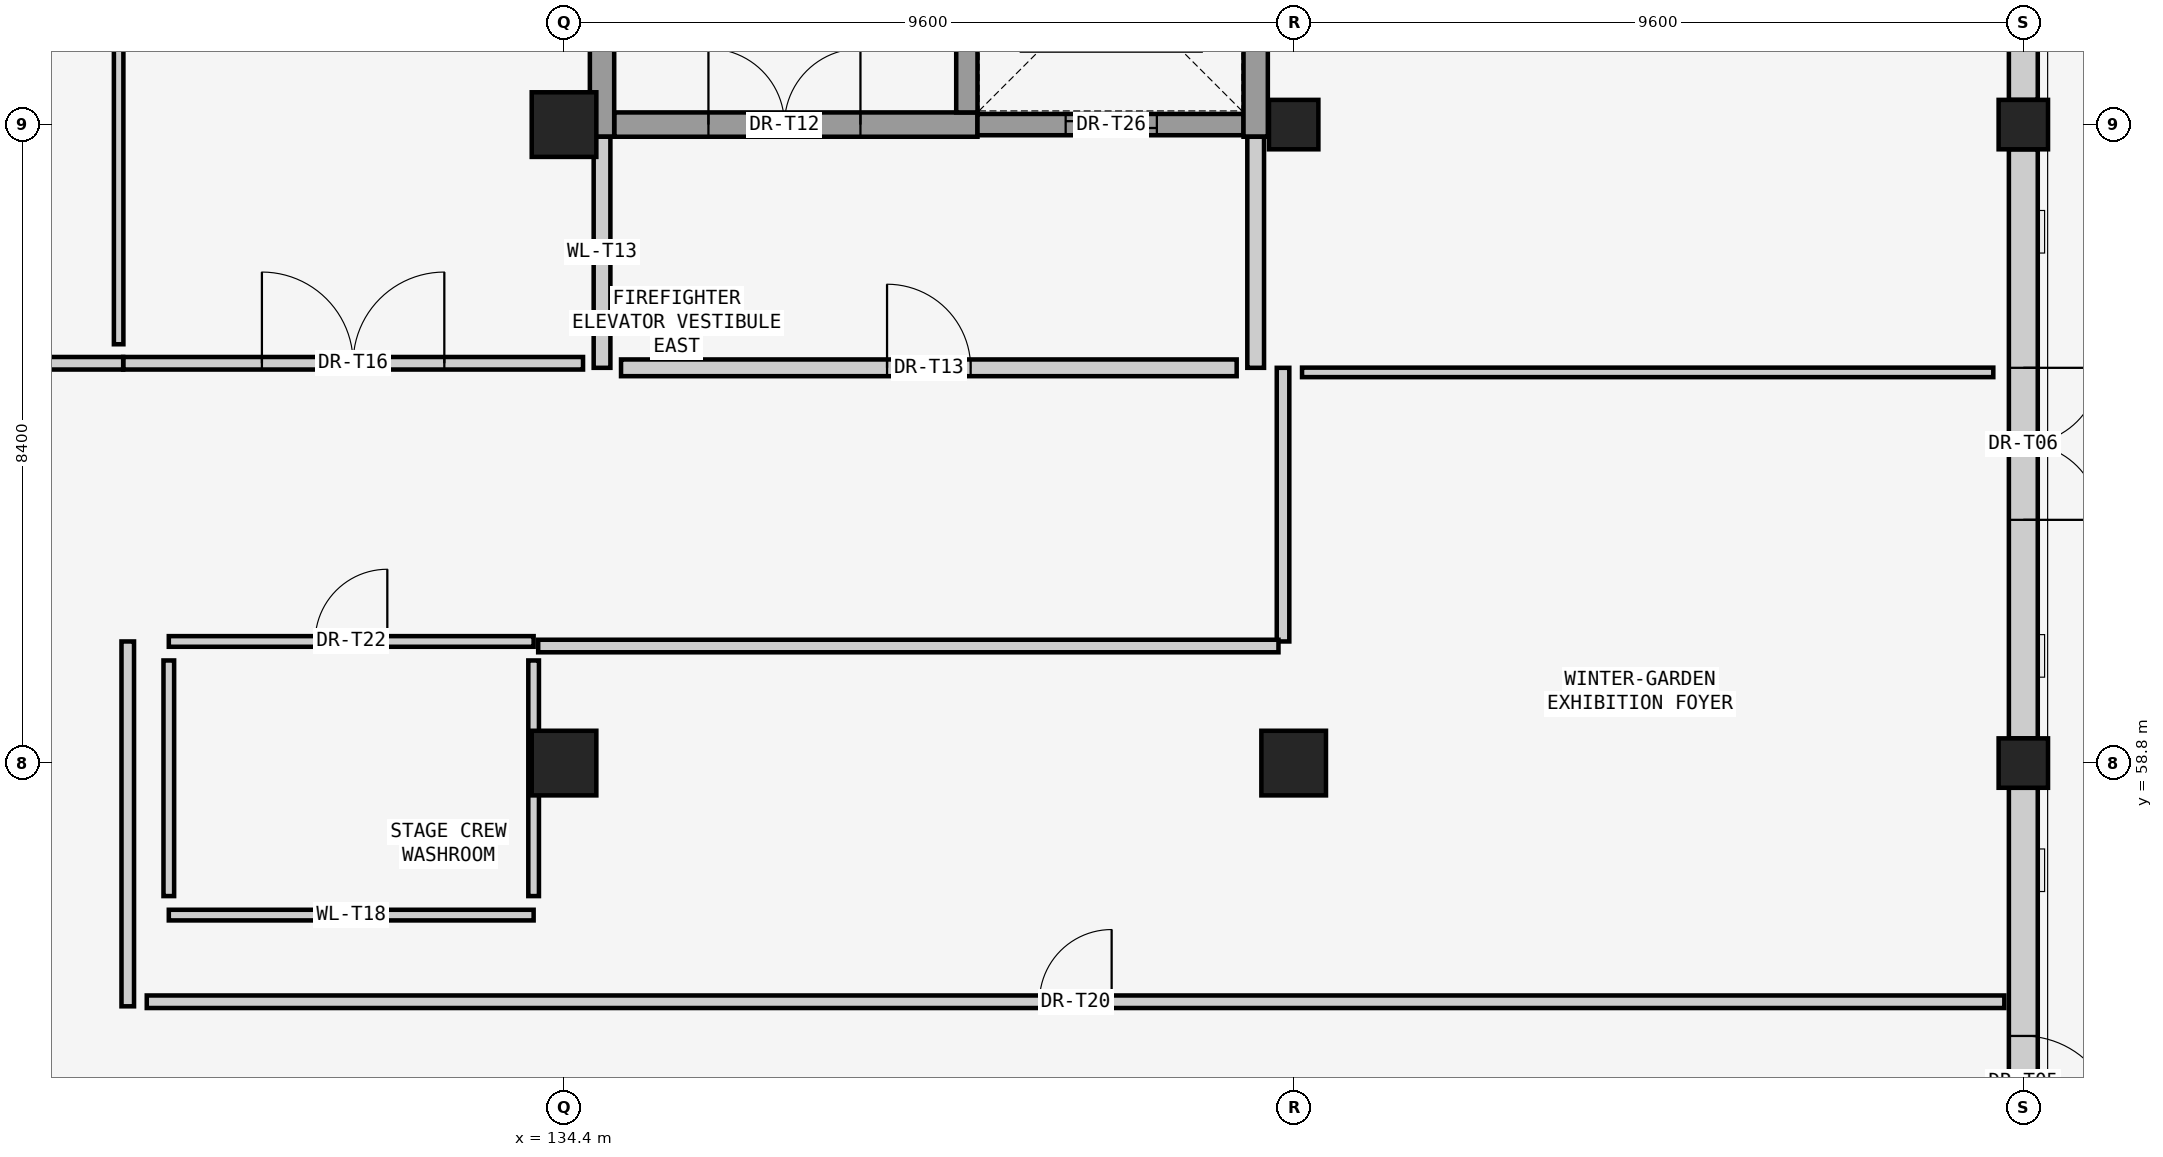
"""IFC4 building model, lengths in metres.
Left out: names, types, materials, properties, quantities, classifications, styles, units other than length and angle.
Written with IfcOpenShell. Run it as: python <this file> out.ifc"""

import sys

from ifc_helpers import new_model, si_unit, direction, frame, frame_2d, origin, origin_2d, place, context, subcontext, project, spatial, rectangle, extrude, element, fill, save


model = new_model("IFC4")
c1 = context("Model", 3, precision=1e-05, world=origin(), true_north=direction((0.0, 1.0)))
c2 = subcontext(c1, "Body", "Model", "MODEL_VIEW")
j1 = project(units=[si_unit("LENGTHUNIT", "METRE"), si_unit("PLANEANGLEUNIT", "RADIAN")], contexts=[c1])
p1 = place(None, origin())
s1 = spatial("IfcSite", under=j1, at=p1, CompositionType="ELEMENT")
p2 = place(p1, origin())
s2 = spatial("IfcBuilding", under=s1, at=p2, CompositionType="ELEMENT")
p3 = place(p2, origin())
s3 = spatial("IfcBuildingStorey", under=s2, at=p3, CompositionType="ELEMENT", Elevation=0.0)
for number, where, z_axis, x_axis in (
    (1, (134.4, 58.8, 0.0), (0.0, 0.0, 1.0), (1.0, 0.0, 0.0)),
    (2, (134.4, 67.2, 0.0), (0.0, 0.0, 1.0), (1.0, 0.0, 0.0)),
    (3, (144.0, 58.8, 0.0), (0.0, 0.0, 1.0), (1.0, 0.0, 0.0)),
):
    element("IfcColumn", number, at=place(p3, frame(where, z_axis=z_axis, x_axis=x_axis)), inside=s3, PredefinedType="COLUMN", context=c2, shape_type="SweptSolid", body=[
        extrude(rectangle(XDim=0.85, YDim=0.85, at=origin_2d()), origin(), (0.0, 0.0, 1.0), 5.12),
    ])
p4 = place(p3, frame((144.0, 67.2, 0.0), z_axis=(0.0, 0.0, 1.0), x_axis=(1.0, 0.0, 0.0)))
e4 = element("IfcColumn", 4, at=p4, inside=s3, PredefinedType="PILASTER", context=c2, shape_type="SweptSolid", body=[
    extrude(rectangle(XDim=0.65, YDim=0.65, at=origin_2d()), origin(), (0.0, 0.0, 1.0), 5.12),
])
for number, where, z_axis, x_axis in (
    (5, (153.6, 58.8, 0.0), (0.0, 0.0, 1.0), (1.0, 0.0, 0.0)),
    (6, (153.6, 67.2, 0.0), (0.0, 0.0, 1.0), (1.0, 0.0, 0.0)),
):
    element("IfcColumn", number, at=place(p3, frame(where, z_axis=z_axis, x_axis=x_axis)), inside=s3, PredefinedType="COLUMN", context=c2, shape_type="SweptSolid", body=[
        extrude(rectangle(XDim=0.65, YDim=0.65, at=origin_2d()), origin(), (0.0, 0.0, 1.0), 5.12),
    ])
p5 = place(p3, frame((153.6, 58.475, 0.0), z_axis=(0.0, 0.0, 1.0), x_axis=(0.0, -1.0, 0.0)))
e7 = element("IfcWall", 7, at=p5, inside=s3, PredefinedType="SOLIDWALL", context=c2, shape_type="SweptSolid", body=[
    extrude(rectangle(XDim=7.75, YDim=0.38, at=frame_2d((3.875, 0.0))), origin(), (0.0, 0.0, 1.0), 4.5),
])
p6 = place(p5, frame((3.265, 0.0, 0.0)))
e8 = element("IfcOpeningElement", 8, at=p6, cuts=e7, PredefinedType="OPENING", context=c2, shape_type="SweptSolid", body=[
    extrude(rectangle(XDim=1.22, YDim=2.25, at=frame_2d((0.61, 1.125))), frame((0.0, 0.2, 0.0), z_axis=(0.0, -1.0, 0.0), x_axis=(1.0, 0.0, 0.0)), (0.0, 0.0, 1.0), 0.4),
])
p7 = place(p3, frame((153.6, 66.875, 0.0), z_axis=(0.0, 0.0, 1.0), x_axis=(0.0, -1.0, 0.0)))
e9 = element("IfcWall", 9, at=p7, inside=s3, PredefinedType="SOLIDWALL", context=c2, shape_type="SweptSolid", body=[
    extrude(rectangle(XDim=7.75, YDim=0.38, at=frame_2d((3.875, 0.0))), origin(), (0.0, 0.0, 1.0), 4.5),
])
p8 = place(p7, frame((2.875, 0.0, 0.0)))
e10 = element("IfcOpeningElement", 10, at=p8, cuts=e9, PredefinedType="OPENING", context=c2, shape_type="SweptSolid", body=[
    extrude(rectangle(XDim=2.0, YDim=2.25, at=frame_2d((1.0, 1.125))), frame((0.0, 0.2, 0.0), z_axis=(0.0, -1.0, 0.0), x_axis=(1.0, 0.0, 0.0)), (0.0, 0.0, 1.0), 0.4),
])
p9 = place(p3, frame((153.6, 75.275, 0.0), z_axis=(0.0, 0.0, 1.0), x_axis=(0.0, -1.0, 0.0)))
e11 = element("IfcWall", 11, at=p9, inside=s3, PredefinedType="SOLIDWALL", context=c2, shape_type="SweptSolid", body=[
    extrude(rectangle(XDim=7.75, YDim=0.38, at=frame_2d((3.875, 0.0))), origin(), (0.0, 0.0, 1.0), 4.5),
])
p10 = place(p9, frame((1.195, 0.0, 0.85)))
e12 = element("IfcOpeningElement", 12, at=p10, cuts=e11, PredefinedType="OPENING", context=c2, shape_type="SweptSolid", body=[
    extrude(rectangle(XDim=1.95, YDim=2.5, at=frame_2d((0.975, 1.25))), frame((0.0, 0.2, 0.0), z_axis=(0.0, -1.0, 0.0), x_axis=(1.0, 0.0, 0.0)), (0.0, 0.0, 1.0), 0.4),
])
p11 = place(p3, frame((135.06, 67.2, 0.0), z_axis=(0.0, 0.0, 1.0), x_axis=(1.0, 0.0, 0.0)))
e13 = element("IfcWall", 13, at=p11, inside=s3, PredefinedType="SHEAR", context=c2, shape_type="SweptSolid", body=[
    extrude(rectangle(XDim=4.78, YDim=0.32, at=frame_2d((2.39, 0.0))), origin(), (0.0, 0.0, 1.0), 5.1),
])
p12 = place(p11, frame((1.24, 0.0, 0.0)))
e14 = element("IfcOpeningElement", 14, at=p12, cuts=e13, PredefinedType="OPENING", context=c2, shape_type="SweptSolid", body=[
    extrude(rectangle(XDim=2.0, YDim=2.2, at=frame_2d((1.0, 1.1))), frame((0.0, 0.17, 0.0), z_axis=(0.0, -1.0, 0.0), x_axis=(1.0, 0.0, 0.0)), (0.0, 0.0, 1.0), 0.34),
])
p13 = place(p3, frame((139.84, 67.2, 0.0), z_axis=(0.0, 0.0, 1.0), x_axis=(1.0, 0.0, 0.0)))
e15 = element("IfcWall", 15, at=p13, inside=s3, PredefinedType="SHEAR", context=c2, shape_type="SweptSolid", body=[
    extrude(rectangle(XDim=3.5, YDim=0.28, at=frame_2d((1.75, 0.0))), origin(), (0.0, 0.0, 1.0), 5.1),
])
p14 = place(p13, frame((1.16, 0.0, 0.0)))
e16 = element("IfcOpeningElement", 16, at=p14, cuts=e15, PredefinedType="OPENING", context=c2, shape_type="SweptSolid", body=[
    extrude(rectangle(XDim=1.2, YDim=2.2, at=frame_2d((0.6, 1.1))), frame((0.0, 0.15, 0.0), z_axis=(0.0, -1.0, 0.0), x_axis=(1.0, 0.0, 0.0)), (0.0, 0.0, 1.0), 0.3),
])
for number, where, z_axis, x_axis in (
    (17, (134.9, 75.4, 0.0), (0.0, 0.0, 1.0), (0.0, -1.0, 0.0)),
    (18, (143.5, 67.04, 0.0), (0.0, 0.0, 1.0), (0.0, 1.0, 0.0)),
):
    element("IfcWall", number, at=place(p3, frame(where, z_axis=z_axis, x_axis=x_axis)), inside=s3, PredefinedType="SHEAR", context=c2, shape_type="SweptSolid", body=[
        extrude(rectangle(XDim=8.36, YDim=0.32, at=frame_2d((4.18, 0.0))), origin(), (0.0, 0.0, 1.0), 5.1),
    ])
p15 = place(p3, frame((139.7, 67.36, 0.0), z_axis=(0.0, 0.0, 1.0), x_axis=(0.0, 1.0, 0.0)))
e19 = element("IfcWall", 19, at=p15, inside=s3, PredefinedType="SHEAR", context=c2, shape_type="SweptSolid", body=[
    extrude(rectangle(XDim=7.72, YDim=0.28, at=frame_2d((3.86, 0.0))), origin(), (0.0, 0.0, 1.0), 5.1),
])
for number, where, z_axis, x_axis in (
    (20, (134.9, 64.0, 0.0), (0.0, 0.0, 1.0), (0.0, 1.0, 0.0)),
    (21, (143.5, 64.0, 0.0), (0.0, 0.0, 1.0), (0.0, 1.0, 0.0)),
):
    element("IfcWall", number, at=place(p3, frame(where, z_axis=z_axis, x_axis=x_axis)), inside=s3, PredefinedType="SOLIDWALL", context=c2, shape_type="SweptSolid", body=[
        extrude(rectangle(XDim=3.04, YDim=0.22, at=frame_2d((1.52, 0.0))), origin(), (0.0, 0.0, 1.0), 4.92),
    ])
p16 = place(p3, frame((135.15, 64.0, 0.0), z_axis=(0.0, 0.0, 1.0), x_axis=(1.0, 0.0, 0.0)))
e22 = element("IfcWall", 22, at=p16, inside=s3, PredefinedType="SOLIDWALL", context=c2, shape_type="SweptSolid", body=[
    extrude(rectangle(XDim=8.1, YDim=0.22, at=frame_2d((4.05, 0.0))), origin(), (0.0, 0.0, 1.0), 4.92),
])
p17 = place(p16, frame((3.5, 0.0, 0.0)))
e23 = element("IfcOpeningElement", 23, at=p17, cuts=e22, PredefinedType="OPENING", context=c2, shape_type="SweptSolid", body=[
    extrude(rectangle(XDim=1.1, YDim=2.2, at=frame_2d((0.55, 1.1))), frame((0.0, 0.12, 0.0), z_axis=(0.0, -1.0, 0.0), x_axis=(1.0, 0.0, 0.0)), (0.0, 0.0, 1.0), 0.24),
])
p18 = place(p3, frame((129.2, 56.8, 0.0), z_axis=(0.0, 0.0, 1.0), x_axis=(1.0, 0.0, 0.0)))
e24 = element("IfcWall", 24, at=p18, inside=s3, PredefinedType="PARTITIONING", context=c2, shape_type="SweptSolid", body=[
    extrude(rectangle(XDim=4.8, YDim=0.14, at=frame_2d((2.4, 0.0))), origin(), (0.0, 0.0, 1.0), 4.92),
])
p19 = place(p3, frame((129.2, 60.4, 0.0), z_axis=(0.0, 0.0, 1.0), x_axis=(1.0, 0.0, 0.0)))
e25 = element("IfcWall", 25, at=p19, inside=s3, PredefinedType="PARTITIONING", context=c2, shape_type="SweptSolid", body=[
    extrude(rectangle(XDim=4.8, YDim=0.14, at=frame_2d((2.4, 0.0))), origin(), (0.0, 0.0, 1.0), 4.92),
])
p20 = place(p19, frame((1.925, 0.0, 0.0)))
e26 = element("IfcOpeningElement", 26, at=p20, cuts=e25, PredefinedType="OPENING", context=c2, shape_type="SweptSolid", body=[
    extrude(rectangle(XDim=0.95, YDim=2.15, at=frame_2d((0.475, 1.075))), frame((0.0, 0.08, 0.0), z_axis=(0.0, -1.0, 0.0), x_axis=(1.0, 0.0, 0.0)), (0.0, 0.0, 1.0), 0.16),
])
for number, where, z_axis, x_axis in (
    (27, (129.2, 57.05, 0.0), (0.0, 0.0, 1.0), (0.0, 1.0, 0.0)),
    (28, (134.0, 57.05, 0.0), (0.0, 0.0, 1.0), (0.0, 1.0, 0.0)),
):
    element("IfcWall", number, at=place(p3, frame(where, z_axis=z_axis, x_axis=x_axis)), inside=s3, PredefinedType="PARTITIONING", context=c2, shape_type="SweptSolid", body=[
        extrude(rectangle(XDim=3.1, YDim=0.14, at=frame_2d((1.55, 0.0))), origin(), (0.0, 0.0, 1.0), 4.92),
    ])
p21 = place(p3, frame((128.6, 64.06, 0.0), z_axis=(0.0, 0.0, 1.0), x_axis=(1.0, 0.0, 0.0)))
e29 = element("IfcWall", 29, at=p21, inside=s3, PredefinedType="PARTITIONING", context=c2, shape_type="SweptSolid", body=[
    extrude(rectangle(XDim=6.05, YDim=0.165, at=frame_2d((3.025, 0.0))), origin(), (0.0, 0.0, 1.0), 4.99),
])
p22 = place(p21, frame((1.825, 0.0, 0.0)))
e30 = element("IfcOpeningElement", 30, at=p22, cuts=e29, PredefinedType="OPENING", context=c2, shape_type="SweptSolid", body=[
    extrude(rectangle(XDim=2.4, YDim=2.8, at=frame_2d((1.2, 1.4))), frame((0.0, 0.093, 0.0), z_axis=(0.0, -1.0, 0.0), x_axis=(1.0, 0.0, 0.0)), (0.0, 0.0, 1.0), 0.185),
])
p23 = place(p3, frame((125.0, 64.06, 0.0), z_axis=(0.0, 0.0, 1.0), x_axis=(1.0, 0.0, 0.0)))
e31 = element("IfcWall", 31, at=p23, inside=s3, PredefinedType="PARTITIONING", context=c2, shape_type="SweptSolid", body=[
    extrude(rectangle(XDim=3.6, YDim=0.165, at=frame_2d((1.8, 0.0))), origin(), (0.0, 0.0, 1.0), 4.99),
])
p24 = place(p3, frame((143.86, 60.4, 0.0), z_axis=(0.0, 0.0, 1.0), x_axis=(0.0, 1.0, 0.0)))
e32 = element("IfcWall", 32, at=p24, inside=s3, PredefinedType="PARTITIONING", context=c2, shape_type="SweptSolid", body=[
    extrude(rectangle(XDim=3.6, YDim=0.165, at=frame_2d((1.8, 0.0))), origin(), (0.0, 0.0, 1.0), 4.4),
])
p25 = place(p3, frame((134.06, 60.34, 0.0), z_axis=(0.0, 0.0, 1.0), x_axis=(1.0, 0.0, 0.0)))
e33 = element("IfcWall", 33, at=p25, inside=s3, PredefinedType="PARTITIONING", context=c2, shape_type="SweptSolid", body=[
    extrude(rectangle(XDim=9.74, YDim=0.165, at=frame_2d((4.87, 0.0))), origin(), (0.0, 0.0, 1.0), 4.99),
])
p26 = place(p3, frame((128.66, 55.6, 0.0), z_axis=(0.0, 0.0, 1.0), x_axis=(0.0, 1.0, 0.0)))
e34 = element("IfcWall", 34, at=p26, inside=s3, PredefinedType="PARTITIONING", context=c2, shape_type="SweptSolid", body=[
    extrude(rectangle(XDim=4.8, YDim=0.165, at=frame_2d((2.4, 0.0))), origin(), (0.0, 0.0, 1.0), 4.99),
])
p27 = place(p3, frame((128.91, 55.66, 0.0), z_axis=(0.0, 0.0, 1.0), x_axis=(1.0, 0.0, 0.0)))
e35 = element("IfcWall", 35, at=p27, inside=s3, PredefinedType="PARTITIONING", context=c2, shape_type="SweptSolid", body=[
    extrude(rectangle(XDim=24.44, YDim=0.165, at=frame_2d((12.22, 0.0))), origin(), (0.0, 0.0, 1.0), 4.99),
])
p28 = place(p27, frame((11.745, 0.0, 0.0)))
e36 = element("IfcOpeningElement", 36, at=p28, cuts=e35, PredefinedType="OPENING", context=c2, shape_type="SweptSolid", body=[
    extrude(rectangle(XDim=0.95, YDim=2.15, at=frame_2d((0.475, 1.075))), frame((0.0, 0.093, 0.0), z_axis=(0.0, -1.0, 0.0), x_axis=(1.0, 0.0, 0.0)), (0.0, 0.0, 1.0), 0.185),
])
p29 = place(p3, frame((128.54, 64.31, 0.0), z_axis=(0.0, 0.0, 1.0), x_axis=(0.0, 1.0, 0.0)))
e37 = element("IfcWall", 37, at=p29, inside=s3, PredefinedType="PARTITIONING", context=c2, shape_type="SweptSolid", body=[
    extrude(rectangle(XDim=19.44, YDim=0.125, at=frame_2d((9.72, 0.0))), origin(), (0.0, 0.0, 1.0), 4.99),
])
p30 = place(p3, frame((144.11, 63.94, 0.0), z_axis=(0.0, 0.0, 1.0), x_axis=(1.0, 0.0, 0.0)))
e38 = element("IfcWall", 38, at=p30, inside=s3, PredefinedType="PARTITIONING", context=c2, shape_type="SweptSolid", body=[
    extrude(rectangle(XDim=9.095, YDim=0.125, at=frame_2d((4.547, 0.0))), origin(), (0.0, 0.0, 1.0), 5.07),
])
p31 = place(p6, origin())
e39 = element("IfcDoor", 39, at=p31, inside=s3, OperationType="SINGLE_SWING_RIGHT", PredefinedType="DOOR", context=c2, shape_type="SweptSolid", body=[
    extrude(rectangle(XDim=1.22, YDim=2.25, at=frame_2d((0.61, 1.125))), frame((0.0, 0.025, 0.0), z_axis=(0.0, -1.0, 0.0), x_axis=(1.0, 0.0, 0.0)), (0.0, 0.0, 1.0), 0.05),
])
fill(e8, e39)
p32 = place(p8, origin())
e40 = element("IfcDoor", 40, at=p32, inside=s3, OperationType="DOUBLE_DOOR_SINGLE_SWING", PredefinedType="DOOR", context=c2, shape_type="SweptSolid", body=[
    extrude(rectangle(XDim=2.0, YDim=2.25, at=frame_2d((1.0, 1.125))), frame((0.0, 0.025, 0.0), z_axis=(0.0, -1.0, 0.0), x_axis=(1.0, 0.0, 0.0)), (0.0, 0.0, 1.0), 0.05),
])
fill(e10, e40)
p33 = place(p12, origin())
e41 = element("IfcDoor", 41, at=p33, inside=s3, OperationType="DOUBLE_SWING_LEFT", PredefinedType="DOOR", context=c2, shape_type="SweptSolid", body=[
    extrude(rectangle(XDim=2.0, YDim=2.2, at=frame_2d((1.0, 1.1))), frame((0.0, 0.025, 0.0), z_axis=(0.0, -1.0, 0.0), x_axis=(1.0, 0.0, 0.0)), (0.0, 0.0, 1.0), 0.05),
])
fill(e14, e41)
p34 = place(p14, origin())
e42 = element("IfcDoor", 42, at=p34, inside=s3, OperationType="SLIDING_TO_RIGHT", PredefinedType="DOOR", context=c2, shape_type="SweptSolid", body=[
    extrude(rectangle(XDim=1.2, YDim=2.2, at=frame_2d((0.6, 1.1))), frame((0.0, 0.025, 0.0), z_axis=(0.0, -1.0, 0.0), x_axis=(1.0, 0.0, 0.0)), (0.0, 0.0, 1.0), 0.05),
])
fill(e16, e42)
p35 = place(p17, origin())
e43 = element("IfcDoor", 43, at=p35, inside=s3, OperationType="SINGLE_SWING_LEFT", PredefinedType="DOOR", context=c2, shape_type="SweptSolid", body=[
    extrude(rectangle(XDim=1.1, YDim=2.2, at=frame_2d((0.55, 1.1))), frame((0.0, 0.025, 0.0), z_axis=(0.0, -1.0, 0.0), x_axis=(1.0, 0.0, 0.0)), (0.0, 0.0, 1.0), 0.05),
])
fill(e23, e43)
p36 = place(p20, origin())
e44 = element("IfcDoor", 44, at=p36, inside=s3, OperationType="SINGLE_SWING_RIGHT", PredefinedType="DOOR", context=c2, shape_type="SweptSolid", body=[
    extrude(rectangle(XDim=0.95, YDim=2.15, at=frame_2d((0.475, 1.075))), frame((0.0, 0.025, 0.0), z_axis=(0.0, -1.0, 0.0), x_axis=(1.0, 0.0, 0.0)), (0.0, 0.0, 1.0), 0.05),
])
fill(e26, e44)
p37 = place(p22, origin())
e45 = element("IfcDoor", 45, at=p37, inside=s3, OperationType="DOUBLE_SWING_LEFT", PredefinedType="DOOR", context=c2, shape_type="SweptSolid", body=[
    extrude(rectangle(XDim=2.4, YDim=2.8, at=frame_2d((1.2, 1.4))), frame((0.0, 0.025, 0.0), z_axis=(0.0, -1.0, 0.0), x_axis=(1.0, 0.0, 0.0)), (0.0, 0.0, 1.0), 0.05),
])
fill(e30, e45)
p38 = place(p28, origin())
e46 = element("IfcDoor", 46, at=p38, inside=s3, OperationType="SINGLE_SWING_RIGHT", PredefinedType="DOOR", context=c2, shape_type="SweptSolid", body=[
    extrude(rectangle(XDim=0.95, YDim=2.15, at=frame_2d((0.475, 1.075))), frame((0.0, 0.025, 0.0), z_axis=(0.0, -1.0, 0.0), x_axis=(1.0, 0.0, 0.0)), (0.0, 0.0, 1.0), 0.05),
])
fill(e36, e46)
save(model, sys.argv[1])
